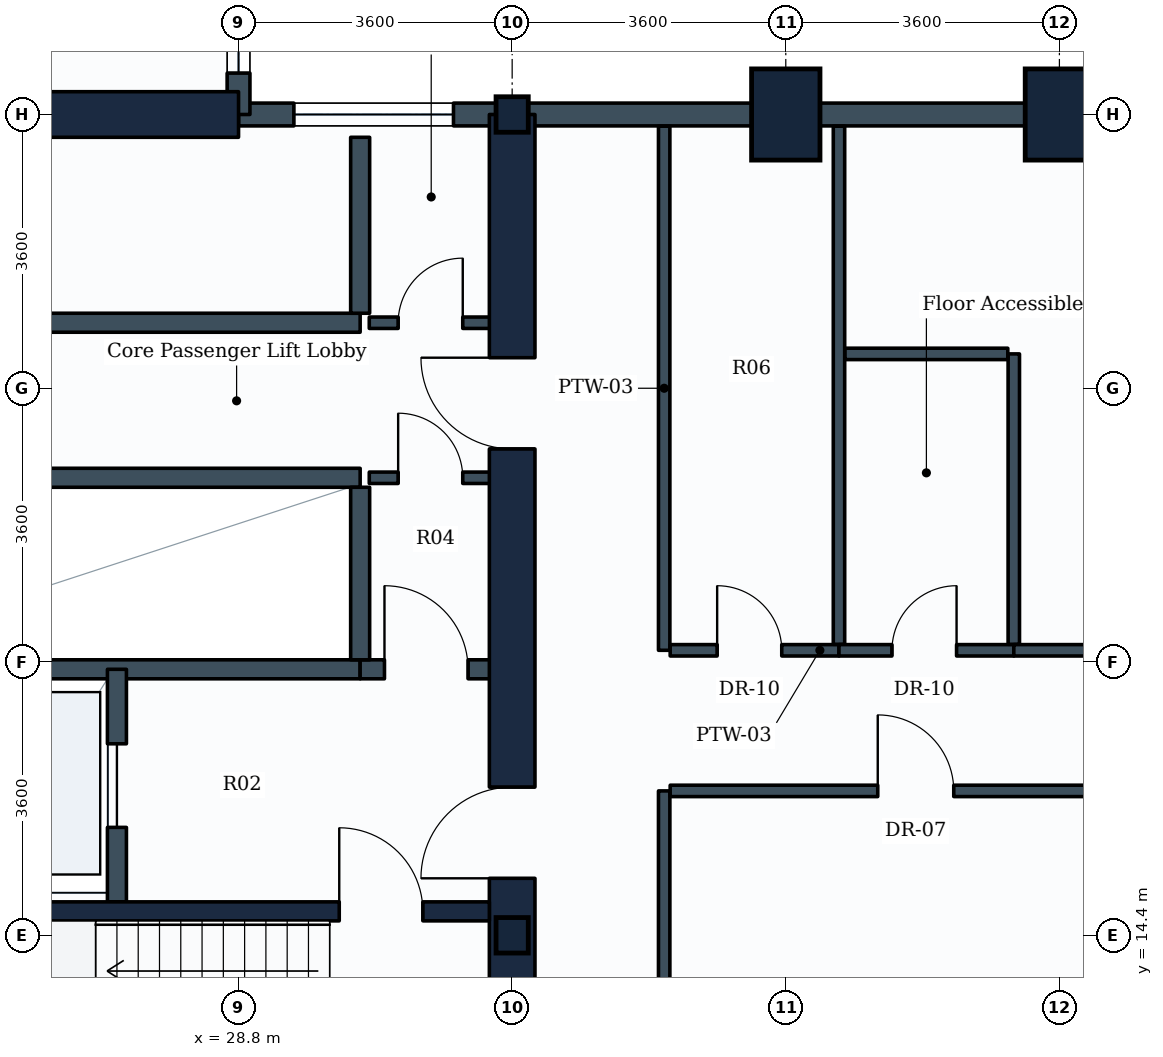
"""IFC4 building model, lengths in metres.
Left out: names, types, materials, properties, quantities, classifications, styles, units other than length and angle.
Written with IfcOpenShell. Run it as: python <this file> out.ifc"""

import sys

from ifc_helpers import new_model, si_unit, direction, frame, frame_2d, origin, origin_2d, place, context, subcontext, project, spatial, rectangle, i_section, extrude, element, fill, save


model = new_model("IFC4")
c1 = context("Model", 3, precision=1e-05, world=origin(), true_north=direction((0.0, 1.0)))
c2 = subcontext(c1, "Body", "Model", "MODEL_VIEW")
j1 = project(units=[si_unit("LENGTHUNIT", "METRE"), si_unit("PLANEANGLEUNIT", "RADIAN")], contexts=[c1])
p1 = place(None, origin())
s1 = spatial("IfcSite", under=j1, at=p1, CompositionType="ELEMENT")
p2 = place(p1, origin())
s2 = spatial("IfcBuilding", under=s1, at=p2, CompositionType="ELEMENT")
p3 = place(p2, frame((0.0, 0.0, 43.5)))
s3 = spatial("IfcBuildingStorey", under=s2, at=p3, CompositionType="ELEMENT", Elevation=43.5)
for number, where, z_axis, x_axis in (
    (1, (32.4, 14.4, 0.0), (0.0, 0.0, 1.0), (1.0, 0.0, 0.0)),
    (2, (32.4, 25.2, 0.0), (0.0, 0.0, 1.0), (1.0, 0.0, 0.0)),
):
    element("IfcColumn", number, at=place(p3, frame(where, z_axis=z_axis, x_axis=x_axis)), inside=s3, PredefinedType="COLUMN", context=c2, shape_type="SweptSolid", body=[
        extrude(i_section(OverallWidth=0.424, OverallDepth=0.467, WebThickness=0.033, FlangeThickness=0.053, FilletRadius=0.015, at=origin_2d()), origin(), (0.0, 0.0, 1.0), 3.9),
    ])
for number, where, z_axis, x_axis in (
    (3, (36.0, 25.2, 0.0), (0.0, 0.0, 1.0), (1.0, 0.0, 0.0)),
    (4, (39.6, 25.2, 0.0), (0.0, 0.0, 1.0), (1.0, 0.0, 0.0)),
):
    element("IfcColumn", number, at=place(p3, frame(where, z_axis=z_axis, x_axis=x_axis)), inside=s3, PredefinedType="COLUMN", context=c2, shape_type="SweptSolid", body=[
        extrude(rectangle(XDim=0.9, YDim=1.2, at=origin_2d()), origin(), (0.0, 0.0, 1.0), 3.9),
    ])
p4 = place(p3, frame((39.6, 25.2, 0.0), z_axis=(0.0, 0.0, 1.0), x_axis=(1.0, 0.0, 0.0)))
e5 = element("IfcWall", 5, at=p4, inside=s3, PredefinedType="STANDARD", context=c2, shape_type="SweptSolid", body=[
    extrude(rectangle(XDim=3.6, YDim=0.3, at=frame_2d((1.8, 0.0))), origin(), (0.0, 0.0, 1.0), 2.93),
])
for number, where, z_axis, x_axis in (
    (6, (36.0, 25.2, 0.0), (0.0, 0.0, 1.0), (1.0, 0.0, 0.0)),
    (7, (32.4, 25.2, 0.0), (0.0, 0.0, 1.0), (1.0, 0.0, 0.0)),
):
    element("IfcWall", number, at=place(p3, frame(where, z_axis=z_axis, x_axis=x_axis)), inside=s3, PredefinedType="STANDARD", context=c2, shape_type="SweptSolid", body=[
        extrude(rectangle(XDim=3.6, YDim=0.3, at=frame_2d((1.8, 0.0))), origin(), (0.0, 0.0, 1.0), 2.93),
    ])
p5 = place(p3, frame((28.8, 25.2, 0.0), z_axis=(0.0, 0.0, 1.0), x_axis=(1.0, 0.0, 0.0)))
e8 = element("IfcWall", 8, at=p5, inside=s3, PredefinedType="STANDARD", context=c2, shape_type="SweptSolid", body=[
    extrude(rectangle(XDim=3.6, YDim=0.3, at=frame_2d((1.8, 0.0))), origin(), (0.0, 0.0, 1.0), 3.635),
])
p6 = place(p5, frame((0.728, 0.0, 0.85)))
e9 = element("IfcOpeningElement", 9, at=p6, cuts=e8, PredefinedType="OPENING", context=c2, shape_type="SweptSolid", body=[
    extrude(rectangle(XDim=2.1, YDim=1.35, at=frame_2d((1.05, 0.675))), frame((0.0, 0.16, 0.0), z_axis=(0.0, -1.0, 0.0), x_axis=(1.0, 0.0, 0.0)), (0.0, 0.0, 1.0), 0.32),
])
p7 = place(p3, frame((28.8, 25.2, 0.0), z_axis=(0.0, 0.0, 1.0), x_axis=(0.0, 1.0, 0.0)))
e10 = element("IfcWall", 10, at=p7, inside=s3, PredefinedType="STANDARD", context=c2, shape_type="SweptSolid", body=[
    extrude(rectangle(XDim=3.6, YDim=0.3, at=frame_2d((1.8, 0.0))), origin(), (0.0, 0.0, 1.0), 3.14),
])
p8 = place(p7, frame((0.545, 0.0, 0.85)))
e11 = element("IfcOpeningElement", 11, at=p8, cuts=e10, PredefinedType="OPENING", context=c2, shape_type="SweptSolid", body=[
    extrude(rectangle(XDim=2.1, YDim=1.35, at=frame_2d((1.05, 0.675))), frame((0.0, 0.16, 0.0), z_axis=(0.0, -1.0, 0.0), x_axis=(1.0, 0.0, 0.0)), (0.0, 0.0, 1.0), 0.32),
])
p9 = place(p3, frame((14.4, 25.2, 0.0), z_axis=(0.0, 0.0, 1.0), x_axis=(1.0, 0.0, 0.0)))
e12 = element("IfcWall", 12, at=p9, inside=s3, PredefinedType="SHEAR", context=c2, shape_type="SweptSolid", body=[
    extrude(rectangle(XDim=14.4, YDim=0.6, at=frame_2d((7.2, 0.0))), origin(), (0.0, 0.0, 1.0), 3.65),
])
p10 = place(p3, frame((32.4, 10.8, 0.0), z_axis=(0.0, 0.0, 1.0), x_axis=(0.0, 1.0, 0.0)))
e13 = element("IfcWall", 13, at=p10, inside=s3, PredefinedType="SHEAR", context=c2, shape_type="SweptSolid", body=[
    extrude(rectangle(XDim=14.4, YDim=0.6, at=frame_2d((7.2, 0.0))), origin(), (0.0, 0.0, 1.0), 3.65),
])
p11 = place(p10, frame((4.35, 0.0, 0.0)))
e14 = element("IfcOpeningElement", 14, at=p11, cuts=e13, PredefinedType="OPENING", context=c2, shape_type="SweptSolid", body=[
    extrude(rectangle(XDim=1.2, YDim=2.1, at=frame_2d((0.6, 1.05))), frame((0.0, 0.31, 0.0), z_axis=(0.0, -1.0, 0.0), x_axis=(1.0, 0.0, 0.0)), (0.0, 0.0, 1.0), 0.62),
])
p12 = place(p10, frame((10.0, 0.0, 0.0)))
e15 = element("IfcOpeningElement", 15, at=p12, cuts=e13, PredefinedType="OPENING", context=c2, shape_type="SweptSolid", body=[
    extrude(rectangle(XDim=1.2, YDim=2.1, at=frame_2d((0.6, 1.05))), frame((0.0, 0.31, 0.0), z_axis=(0.0, -1.0, 0.0), x_axis=(1.0, 0.0, 0.0)), (0.0, 0.0, 1.0), 0.62),
])
p13 = place(p3, frame((23.35, 14.715, 0.0), z_axis=(0.0, 0.0, 1.0), x_axis=(1.0, 0.0, 0.0)))
e16 = element("IfcWall", 16, at=p13, inside=s3, PredefinedType="SHEAR", context=c2, shape_type="SweptSolid", body=[
    extrude(rectangle(XDim=8.75, YDim=0.25, at=frame_2d((4.375, 0.0))), origin(), (0.0, 0.0, 1.0), 3.65),
])
p14 = place(p13, frame((6.775, 0.0, 0.0)))
e17 = element("IfcOpeningElement", 17, at=p14, cuts=e16, PredefinedType="OPENING", context=c2, shape_type="SweptSolid", body=[
    extrude(rectangle(XDim=1.1, YDim=2.1, at=frame_2d((0.55, 1.05))), frame((0.0, 0.135, 0.0), z_axis=(0.0, -1.0, 0.0), x_axis=(1.0, 0.0, 0.0)), (0.0, 0.0, 1.0), 0.27),
])
p15 = place(p3, frame((21.88, 17.9, 0.0), z_axis=(0.0, 0.0, 1.0), x_axis=(1.0, 0.0, 0.0)))
e18 = element("IfcWall", 18, at=p15, inside=s3, PredefinedType="PARTITIONING", context=c2, shape_type="SweptSolid", body=[
    extrude(rectangle(XDim=8.52, YDim=0.25, at=frame_2d((4.26, 0.0))), origin(), (0.0, 0.0, 1.0), 3.635),
])
p16 = place(p3, frame((30.4, 17.9, 0.0), z_axis=(0.0, 0.0, 1.0), x_axis=(1.0, 0.0, 0.0)))
e19 = element("IfcWall", 19, at=p16, inside=s3, PredefinedType="PARTITIONING", context=c2, shape_type="SweptSolid", body=[
    extrude(rectangle(XDim=1.75, YDim=0.25, at=frame_2d((0.875, 0.0))), origin(), (0.0, 0.0, 1.0), 3.635),
])
p17 = place(p16, frame((0.32, 0.0, 0.0)))
e20 = element("IfcOpeningElement", 20, at=p17, cuts=e19, PredefinedType="OPENING", context=c2, shape_type="SweptSolid", body=[
    extrude(rectangle(XDim=1.1, YDim=2.1, at=frame_2d((0.55, 1.05))), frame((0.0, 0.135, 0.0), z_axis=(0.0, -1.0, 0.0), x_axis=(1.0, 0.0, 0.0)), (0.0, 0.0, 1.0), 0.27),
])
p18 = place(p3, frame((27.2, 14.84, 0.0), z_axis=(0.0, 0.0, 1.0), x_axis=(0.0, 1.0, 0.0)))
e21 = element("IfcWall", 21, at=p18, inside=s3, PredefinedType="PARTITIONING", context=c2, shape_type="SweptSolid", body=[
    extrude(rectangle(XDim=3.06, YDim=0.25, at=frame_2d((1.53, 0.0))), origin(), (0.0, 0.0, 1.0), 3.635),
])
p19 = place(p18, frame((0.98, 0.0, 0.0)))
e22 = element("IfcOpeningElement", 22, at=p19, cuts=e21, PredefinedType="OPENING", context=c2, shape_type="SweptSolid", body=[
    extrude(rectangle(XDim=1.1, YDim=2.1, at=frame_2d((0.55, 1.05))), frame((0.0, 0.135, 0.0), z_axis=(0.0, -1.0, 0.0), x_axis=(1.0, 0.0, 0.0)), (0.0, 0.0, 1.0), 0.27),
])
p20 = place(p3, frame((23.18, 20.42, 0.0), z_axis=(0.0, 0.0, 1.0), x_axis=(1.0, 0.0, 0.0)))
e23 = element("IfcWall", 23, at=p20, inside=s3, PredefinedType="PARTITIONING", context=c2, shape_type="SweptSolid", body=[
    extrude(rectangle(XDim=7.22, YDim=0.25, at=frame_2d((3.61, 0.0))), origin(), (0.0, 0.0, 1.0), 3.635),
])
p21 = place(p3, frame((30.4, 18.025, 0.0), z_axis=(0.0, 0.0, 1.0), x_axis=(0.0, 1.0, 0.0)))
e24 = element("IfcWall", 24, at=p21, inside=s3, PredefinedType="PARTITIONING", context=c2, shape_type="SweptSolid", body=[
    extrude(rectangle(XDim=2.27, YDim=0.25, at=frame_2d((1.135, 0.0))), origin(), (0.0, 0.0, 1.0), 3.635),
])
p22 = place(p3, frame((23.18, 22.46, 0.0), z_axis=(0.0, 0.0, 1.0), x_axis=(1.0, 0.0, 0.0)))
e25 = element("IfcWall", 25, at=p22, inside=s3, PredefinedType="PARTITIONING", context=c2, shape_type="SweptSolid", body=[
    extrude(rectangle(XDim=7.22, YDim=0.25, at=frame_2d((3.61, 0.0))), origin(), (0.0, 0.0, 1.0), 3.635),
])
p23 = place(p3, frame((30.4, 22.585, 0.0), z_axis=(0.0, 0.0, 1.0), x_axis=(0.0, 1.0, 0.0)))
e26 = element("IfcWall", 26, at=p23, inside=s3, PredefinedType="PARTITIONING", context=c2, shape_type="SweptSolid", body=[
    extrude(rectangle(XDim=2.315, YDim=0.25, at=frame_2d((1.157, 0.0))), origin(), (0.0, 0.0, 1.0), 3.635),
])
p24 = place(p3, frame((30.52, 22.46, 0.0), z_axis=(0.0, 0.0, 1.0), x_axis=(1.0, 0.0, 0.0)))
e27 = element("IfcWall", 27, at=p24, inside=s3, PredefinedType="PARTITIONING", context=c2, shape_type="SweptSolid", body=[
    extrude(rectangle(XDim=1.63, YDim=0.15, at=frame_2d((0.815, 0.0))), origin(), (0.0, 0.0, 1.0), 3.635),
])
p25 = place(p24, frame((0.38, 0.0, 0.0)))
e28 = element("IfcOpeningElement", 28, at=p25, cuts=e27, PredefinedType="OPENING", context=c2, shape_type="SweptSolid", body=[
    extrude(rectangle(XDim=0.85, YDim=2.1, at=frame_2d((0.425, 1.05))), frame((0.0, 0.085, 0.0), z_axis=(0.0, -1.0, 0.0), x_axis=(1.0, 0.0, 0.0)), (0.0, 0.0, 1.0), 0.17),
])
p26 = place(p3, frame((30.52, 20.42, 0.0), z_axis=(0.0, 0.0, 1.0), x_axis=(1.0, 0.0, 0.0)))
e29 = element("IfcWall", 29, at=p26, inside=s3, PredefinedType="PARTITIONING", context=c2, shape_type="SweptSolid", body=[
    extrude(rectangle(XDim=1.63, YDim=0.15, at=frame_2d((0.815, 0.0))), origin(), (0.0, 0.0, 1.0), 3.635),
])
p27 = place(p26, frame((0.38, 0.0, 0.0)))
e30 = element("IfcOpeningElement", 30, at=p27, cuts=e29, PredefinedType="OPENING", context=c2, shape_type="SweptSolid", body=[
    extrude(rectangle(XDim=0.85, YDim=2.1, at=frame_2d((0.425, 1.05))), frame((0.0, 0.085, 0.0), z_axis=(0.0, -1.0, 0.0), x_axis=(1.0, 0.0, 0.0)), (0.0, 0.0, 1.0), 0.17),
])
p28 = place(p3, frame((34.4, 18.15, 0.0), z_axis=(0.0, 0.0, 1.0), x_axis=(0.0, 1.0, 0.0)))
e31 = element("IfcWall", 31, at=p28, inside=s3, PredefinedType="PARTITIONING", context=c2, shape_type="SweptSolid", body=[
    extrude(rectangle(XDim=6.896, YDim=0.15, at=frame_2d((3.448, 0.0))), origin(), (0.0, 0.0, 1.0), 2.93),
])
p29 = place(p3, frame((34.479, 18.15, 0.0), z_axis=(0.0, 0.0, 1.0), x_axis=(1.0, 0.0, 0.0)))
e32 = element("IfcWall", 32, at=p29, inside=s3, PredefinedType="PARTITIONING", context=c2, shape_type="SweptSolid", body=[
    extrude(rectangle(XDim=2.221, YDim=0.15, at=frame_2d((1.11, 0.0))), origin(), (0.0, 0.0, 1.0), 3.08),
])
p30 = place(p29, frame((0.618, 0.0, 0.0)))
e33 = element("IfcOpeningElement", 33, at=p30, cuts=e32, PredefinedType="OPENING", context=c2, shape_type="SweptSolid", body=[
    extrude(rectangle(XDim=0.85, YDim=2.1, at=frame_2d((0.425, 1.05))), frame((0.0, 0.085, 0.0), z_axis=(0.0, -1.0, 0.0), x_axis=(1.0, 0.0, 0.0)), (0.0, 0.0, 1.0), 0.17),
])
p31 = place(p3, frame((36.7, 18.229, 0.0), z_axis=(0.0, 0.0, 1.0), x_axis=(0.0, 1.0, 0.0)))
e34 = element("IfcWall", 34, at=p31, inside=s3, PredefinedType="PARTITIONING", context=c2, shape_type="SweptSolid", body=[
    extrude(rectangle(XDim=6.817, YDim=0.15, at=frame_2d((3.408, 0.0))), origin(), (0.0, 0.0, 1.0), 2.93),
])
p32 = place(p3, frame((36.7, 18.15, 0.0), z_axis=(0.0, 0.0, 1.0), x_axis=(1.0, 0.0, 0.0)))
e35 = element("IfcWall", 35, at=p32, inside=s3, PredefinedType="PARTITIONING", context=c2, shape_type="SweptSolid", body=[
    extrude(rectangle(XDim=2.3, YDim=0.15, at=frame_2d((1.15, 0.0))), origin(), (0.0, 0.0, 1.0), 3.08),
])
p33 = place(p32, frame((0.697, 0.0, 0.0)))
e36 = element("IfcOpeningElement", 36, at=p33, cuts=e35, PredefinedType="OPENING", context=c2, shape_type="SweptSolid", body=[
    extrude(rectangle(XDim=0.85, YDim=2.1, at=frame_2d((0.425, 1.05))), frame((0.0, 0.085, 0.0), z_axis=(0.0, -1.0, 0.0), x_axis=(1.0, 0.0, 0.0)), (0.0, 0.0, 1.0), 0.17),
])
p34 = place(p3, frame((39.0, 18.229, 0.0), z_axis=(0.0, 0.0, 1.0), x_axis=(0.0, 1.0, 0.0)))
e37 = element("IfcWall", 37, at=p34, inside=s3, PredefinedType="PARTITIONING", context=c2, shape_type="SweptSolid", body=[
    extrude(rectangle(XDim=3.821, YDim=0.15, at=frame_2d((1.911, 0.0))), origin(), (0.0, 0.0, 1.0), 3.03),
])
p35 = place(p3, frame((36.779, 22.05, 0.0), z_axis=(0.0, 0.0, 1.0), x_axis=(1.0, 0.0, 0.0)))
e38 = element("IfcWall", 38, at=p35, inside=s3, PredefinedType="PARTITIONING", context=c2, shape_type="SweptSolid", body=[
    extrude(rectangle(XDim=2.142, YDim=0.15, at=frame_2d((1.071, 0.0))), origin(), (0.0, 0.0, 1.0), 3.635),
])
p36 = place(p3, frame((34.4, 3.754, 0.0), z_axis=(0.0, 0.0, 1.0), x_axis=(0.0, 1.0, 0.0)))
e39 = element("IfcWall", 39, at=p36, inside=s3, PredefinedType="PARTITIONING", context=c2, shape_type="SweptSolid", body=[
    extrude(rectangle(XDim=12.546, YDim=0.15, at=frame_2d((6.273, 0.0))), origin(), (0.0, 0.0, 1.0), 2.93),
])
p37 = place(p3, frame((34.479, 16.3, 0.0), z_axis=(0.0, 0.0, 1.0), x_axis=(1.0, 0.0, 0.0)))
e40 = element("IfcWall", 40, at=p37, inside=s3, PredefinedType="PARTITIONING", context=c2, shape_type="SweptSolid", body=[
    extrude(rectangle(XDim=6.542, YDim=0.15, at=frame_2d((3.271, 0.0))), origin(), (0.0, 0.0, 1.0), 3.04),
])
p38 = place(p37, frame((2.731, 0.0, 0.0)))
e41 = element("IfcOpeningElement", 41, at=p38, cuts=e40, PredefinedType="OPENING", context=c2, shape_type="SweptSolid", body=[
    extrude(rectangle(XDim=1.0, YDim=2.1, at=frame_2d((0.5, 1.05))), frame((0.0, 0.085, 0.0), z_axis=(0.0, -1.0, 0.0), x_axis=(1.0, 0.0, 0.0)), (0.0, 0.0, 1.0), 0.17),
])
p39 = place(p3, frame((39.0, 18.15, 0.0), z_axis=(0.0, 0.0, 1.0), x_axis=(1.0, 0.0, 0.0)))
e42 = element("IfcWall", 42, at=p39, inside=s3, PredefinedType="PARTITIONING", context=c2, shape_type="SweptSolid", body=[
    extrude(rectangle(XDim=7.911, YDim=0.15, at=frame_2d((3.956, 0.0))), origin(), (0.0, 0.0, 1.0), 3.03),
])
p40 = place(p39, frame((3.455, 0.0, 0.0)))
e43 = element("IfcOpeningElement", 43, at=p40, cuts=e42, PredefinedType="OPENING", context=c2, shape_type="SweptSolid", body=[
    extrude(rectangle(XDim=1.0, YDim=2.1, at=frame_2d((0.5, 1.05))), frame((0.0, 0.085, 0.0), z_axis=(0.0, -1.0, 0.0), x_axis=(1.0, 0.0, 0.0)), (0.0, 0.0, 1.0), 0.17),
])
p41 = place(p6, origin())
e44 = element("IfcWindow", 44, at=p41, inside=s3, PartitioningType="SINGLE_PANEL", PredefinedType="WINDOW", context=c2, shape_type="SweptSolid", body=[
    extrude(rectangle(XDim=2.1, YDim=1.35, at=frame_2d((1.05, 0.675))), frame((0.0, 0.03, 0.0), z_axis=(0.0, -1.0, 0.0), x_axis=(1.0, 0.0, 0.0)), (0.0, 0.0, 1.0), 0.06),
])
fill(e9, e44)
p42 = place(p8, origin())
e45 = element("IfcWindow", 45, at=p42, inside=s3, PartitioningType="SINGLE_PANEL", PredefinedType="WINDOW", context=c2, shape_type="SweptSolid", body=[
    extrude(rectangle(XDim=2.1, YDim=1.35, at=frame_2d((1.05, 0.675))), frame((0.0, 0.03, 0.0), z_axis=(0.0, -1.0, 0.0), x_axis=(1.0, 0.0, 0.0)), (0.0, 0.0, 1.0), 0.06),
])
fill(e11, e45)
p43 = place(p14, origin())
e46 = element("IfcDoor", 46, at=p43, inside=s3, OperationType="SINGLE_SWING_LEFT", PredefinedType="DOOR", context=c2, shape_type="SweptSolid", body=[
    extrude(rectangle(XDim=1.1, YDim=2.1, at=frame_2d((0.55, 1.05))), frame((0.0, 0.025, 0.0), z_axis=(0.0, -1.0, 0.0), x_axis=(1.0, 0.0, 0.0)), (0.0, 0.0, 1.0), 0.05),
])
fill(e17, e46)
p44 = place(p19, origin())
e47 = element("IfcDoor", 47, at=p44, inside=s3, OperationType="SLIDING_TO_LEFT", PredefinedType="DOOR", context=c2, shape_type="SweptSolid", body=[
    extrude(rectangle(XDim=1.1, YDim=2.1, at=frame_2d((0.55, 1.05))), frame((0.0, 0.025, 0.0), z_axis=(0.0, -1.0, 0.0), x_axis=(1.0, 0.0, 0.0)), (0.0, 0.0, 1.0), 0.05),
])
fill(e22, e47)
p45 = place(p11, origin())
e48 = element("IfcDoor", 48, at=p45, inside=s3, OperationType="SINGLE_SWING_LEFT", PredefinedType="DOOR", context=c2, shape_type="SweptSolid", body=[
    extrude(rectangle(XDim=1.2, YDim=2.1, at=frame_2d((0.6, 1.05))), frame((0.0, 0.025, 0.0), z_axis=(0.0, -1.0, 0.0), x_axis=(1.0, 0.0, 0.0)), (0.0, 0.0, 1.0), 0.05),
])
fill(e14, e48)
p46 = place(p17, origin())
e49 = element("IfcDoor", 49, at=p46, inside=s3, OperationType="SINGLE_SWING_LEFT", PredefinedType="DOOR", context=c2, shape_type="SweptSolid", body=[
    extrude(rectangle(XDim=1.1, YDim=2.1, at=frame_2d((0.55, 1.05))), frame((0.0, 0.025, 0.0), z_axis=(0.0, -1.0, 0.0), x_axis=(1.0, 0.0, 0.0)), (0.0, 0.0, 1.0), 0.05),
])
fill(e20, e49)
p47 = place(p12, origin())
e50 = element("IfcDoor", 50, at=p47, inside=s3, OperationType="SINGLE_SWING_RIGHT", PredefinedType="DOOR", context=c2, shape_type="SweptSolid", body=[
    extrude(rectangle(XDim=1.2, YDim=2.1, at=frame_2d((0.6, 1.05))), frame((0.0, 0.025, 0.0), z_axis=(0.0, -1.0, 0.0), x_axis=(1.0, 0.0, 0.0)), (0.0, 0.0, 1.0), 0.05),
])
fill(e15, e50)
p48 = place(p25, origin())
e51 = element("IfcDoor", 51, at=p48, inside=s3, OperationType="SINGLE_SWING_RIGHT", PredefinedType="DOOR", context=c2, shape_type="SweptSolid", body=[
    extrude(rectangle(XDim=0.85, YDim=2.1, at=frame_2d((0.425, 1.05))), frame((0.0, 0.025, 0.0), z_axis=(0.0, -1.0, 0.0), x_axis=(1.0, 0.0, 0.0)), (0.0, 0.0, 1.0), 0.05),
])
fill(e28, e51)
p49 = place(p27, origin())
e52 = element("IfcDoor", 52, at=p49, inside=s3, OperationType="SINGLE_SWING_LEFT", PredefinedType="DOOR", context=c2, shape_type="SweptSolid", body=[
    extrude(rectangle(XDim=0.85, YDim=2.1, at=frame_2d((0.425, 1.05))), frame((0.0, 0.025, 0.0), z_axis=(0.0, -1.0, 0.0), x_axis=(1.0, 0.0, 0.0)), (0.0, 0.0, 1.0), 0.05),
])
fill(e30, e52)
p50 = place(p30, origin())
e53 = element("IfcDoor", 53, at=p50, inside=s3, OperationType="SINGLE_SWING_LEFT", PredefinedType="DOOR", context=c2, shape_type="SweptSolid", body=[
    extrude(rectangle(XDim=0.85, YDim=2.1, at=frame_2d((0.425, 1.05))), frame((0.0, 0.025, 0.0), z_axis=(0.0, -1.0, 0.0), x_axis=(1.0, 0.0, 0.0)), (0.0, 0.0, 1.0), 0.05),
])
fill(e33, e53)
p51 = place(p33, origin())
e54 = element("IfcDoor", 54, at=p51, inside=s3, OperationType="SINGLE_SWING_RIGHT", PredefinedType="DOOR", context=c2, shape_type="SweptSolid", body=[
    extrude(rectangle(XDim=0.85, YDim=2.1, at=frame_2d((0.425, 1.05))), frame((0.0, 0.025, 0.0), z_axis=(0.0, -1.0, 0.0), x_axis=(1.0, 0.0, 0.0)), (0.0, 0.0, 1.0), 0.05),
])
fill(e36, e54)
p52 = place(p38, origin())
e55 = element("IfcDoor", 55, at=p52, inside=s3, OperationType="SINGLE_SWING_LEFT", PredefinedType="DOOR", context=c2, shape_type="SweptSolid", body=[
    extrude(rectangle(XDim=1.0, YDim=2.1, at=frame_2d((0.5, 1.05))), frame((0.0, 0.025, 0.0), z_axis=(0.0, -1.0, 0.0), x_axis=(1.0, 0.0, 0.0)), (0.0, 0.0, 1.0), 0.05),
])
fill(e41, e55)
save(model, sys.argv[1])
